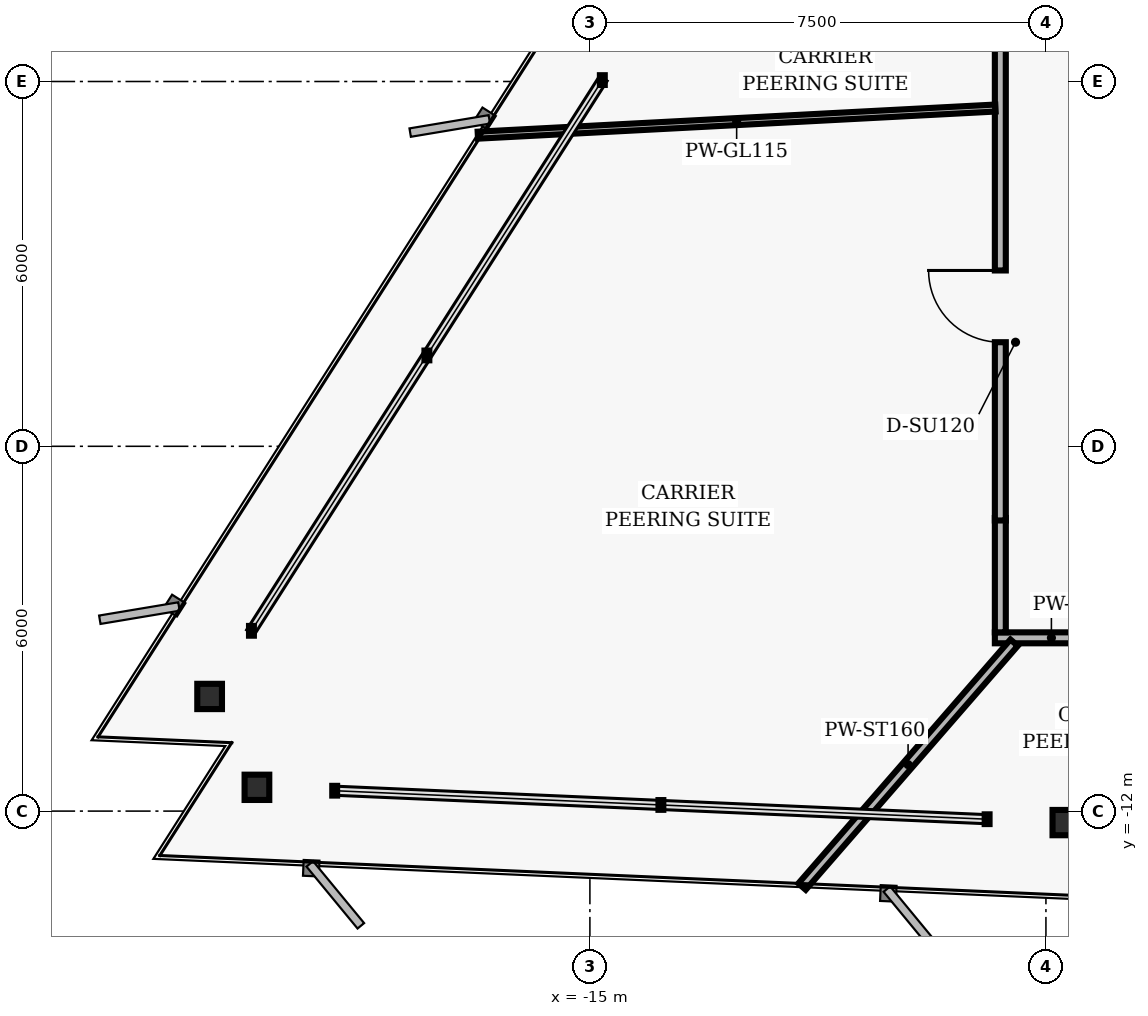
"""IFC4 building model, lengths in metres.
Left out: names, types, materials, properties, quantities, classifications, styles, units other than length and angle.
Written with IfcOpenShell. Run it as: python <this file> out.ifc"""

import sys

from ifc_helpers import new_model, si_unit, direction, frame, frame_2d, origin, origin_2d, place, context, subcontext, project, spatial, rectangle, i_section, extrude, element, fill, save


model = new_model("IFC4")
c1 = context("Model", 3, precision=1e-05, world=origin(), true_north=direction((0.0, 1.0)))
c2 = subcontext(c1, "Body", "Model", "MODEL_VIEW")
j1 = project(units=[si_unit("LENGTHUNIT", "METRE"), si_unit("PLANEANGLEUNIT", "RADIAN")], contexts=[c1])
p1 = place(None, origin())
s1 = spatial("IfcSite", under=j1, at=p1, CompositionType="ELEMENT")
p2 = place(p1, origin())
s2 = spatial("IfcBuilding", under=s1, at=p2, CompositionType="ELEMENT")
p3 = place(p2, frame((0.0, 0.0, 132.0)))
s3 = spatial("IfcBuildingStorey", under=s2, at=p3, CompositionType="ELEMENT", Elevation=132.0)
for number, where, z_axis, x_axis in (
    (1, (-21.254, -10.114, 0.0), (0.0, 0.0, 1.0), (1.0, 0.0, 0.0)),
    (2, (-20.476, -11.609, 0.0), (0.0, 0.0, 1.0), (1.0, 0.0, 0.0)),
    (3, (-7.188, -12.189, 0.0), (0.0, 0.0, 1.0), (1.0, 0.0, 0.0)),
):
    element("IfcColumn", number, at=place(p3, frame(where, z_axis=z_axis, x_axis=x_axis)), inside=s3, PredefinedType="COLUMN", context=c2, shape_type="SweptSolid", body=[
        extrude(i_section(OverallWidth=0.406, OverallDepth=0.416, WebThickness=0.03, FlangeThickness=0.048, FilletRadius=0.02, at=origin_2d()), origin(), (0.0, 0.0, 1.0), 3.04),
    ])
p4 = place(p3, frame((-6.48, -9.15, 0.0), z_axis=(0.0, 0.0, 1.0), x_axis=(-1.0, 0.0, 0.0)))
e4 = element("IfcWall", 4, at=p4, inside=s3, PredefinedType="PARTITIONING", context=c2, shape_type="SweptSolid", body=[
    extrude(rectangle(XDim=1.86, YDim=0.18, at=frame_2d((0.93, 0.0))), origin(), (0.0, 0.0, 1.0), 2.33),
])
p5 = place(p3, frame((-8.25, -9.06, 0.0), z_axis=(0.0, 0.0, 1.0), x_axis=(0.0, 1.0, 0.0)))
e5 = element("IfcWall", 5, at=p5, inside=s3, PredefinedType="PARTITIONING", context=c2, shape_type="SweptSolid", body=[
    extrude(rectangle(XDim=1.88, YDim=0.18, at=frame_2d((0.94, 0.0))), origin(), (0.0, 0.0, 1.0), 2.763),
])
p6 = place(p3, frame((-8.25, -7.22, 0.0), z_axis=(0.0, 0.0, 1.0), x_axis=(0.0, 1.0, 0.0)))
e6 = element("IfcWall", 6, at=p6, inside=s3, PredefinedType="PARTITIONING", context=c2, shape_type="SweptSolid", body=[
    extrude(rectangle(XDim=14.44, YDim=0.18, at=frame_2d((7.22, 0.0))), origin(), (0.0, 0.0, 1.0), 2.763),
])
p7 = place(p6, frame((2.932, 0.0, 0.0)))
e7 = element("IfcOpeningElement", 7, at=p7, cuts=e6, PredefinedType="OPENING", context=c2, shape_type="SweptSolid", body=[
    extrude(rectangle(XDim=1.18, YDim=2.02, at=frame_2d((0.59, 1.01))), frame((0.0, 0.1, 0.0), z_axis=(0.0, -1.0, 0.0), x_axis=(1.0, 0.0, 0.0)), (0.0, 0.0, 1.0), 0.2),
])
p8 = place(p6, frame((9.892, 0.0, 0.0)))
e8 = element("IfcOpeningElement", 8, at=p8, cuts=e6, PredefinedType="OPENING", context=c2, shape_type="SweptSolid", body=[
    extrude(rectangle(XDim=1.18, YDim=2.02, at=frame_2d((0.59, 1.01))), frame((0.0, 0.1, 0.0), z_axis=(0.0, -1.0, 0.0), x_axis=(1.0, 0.0, 0.0)), (0.0, 0.0, 1.0), 0.2),
])
p9 = place(p3, frame((-8.33, -0.437, 0.0), z_axis=(0.0, 0.0, 1.0), x_axis=(-0.998628646782, -0.052352897024, 0.0)))
e9 = element("IfcWall", 9, at=p9, inside=s3, PredefinedType="MOVABLE", context=c2, shape_type="SweptSolid", body=[
    extrude(rectangle(XDim=8.525, YDim=0.115, at=frame_2d((4.262, 0.0))), origin(), (0.0, 0.0, 1.0), 2.763),
])
p10 = place(p3, frame((-8.023, -9.23, 0.0), z_axis=(0.0, 0.0, 1.0), x_axis=(-0.656052478168, -0.754715274716, 0.0)))
e10 = element("IfcWall", 10, at=p10, inside=s3, PredefinedType="PARTITIONING", context=c2, shape_type="SweptSolid", body=[
    extrude(rectangle(XDim=5.315, YDim=0.16, at=frame_2d((2.658, 0.0))), origin(), (0.0, 0.0, 1.0), 2.763),
])
p11 = place(p7, origin())
e11 = element("IfcDoor", 11, at=p11, inside=s3, OperationType="SINGLE_SWING_RIGHT", PredefinedType="DOOR", context=c2, shape_type="SweptSolid", body=[
    extrude(rectangle(XDim=1.18, YDim=2.02, at=frame_2d((0.59, 1.01))), frame((0.0, 0.025, 0.0), z_axis=(0.0, -1.0, 0.0), x_axis=(1.0, 0.0, 0.0)), (0.0, 0.0, 1.0), 0.05),
])
fill(e7, e11)
save(model, sys.argv[1])
